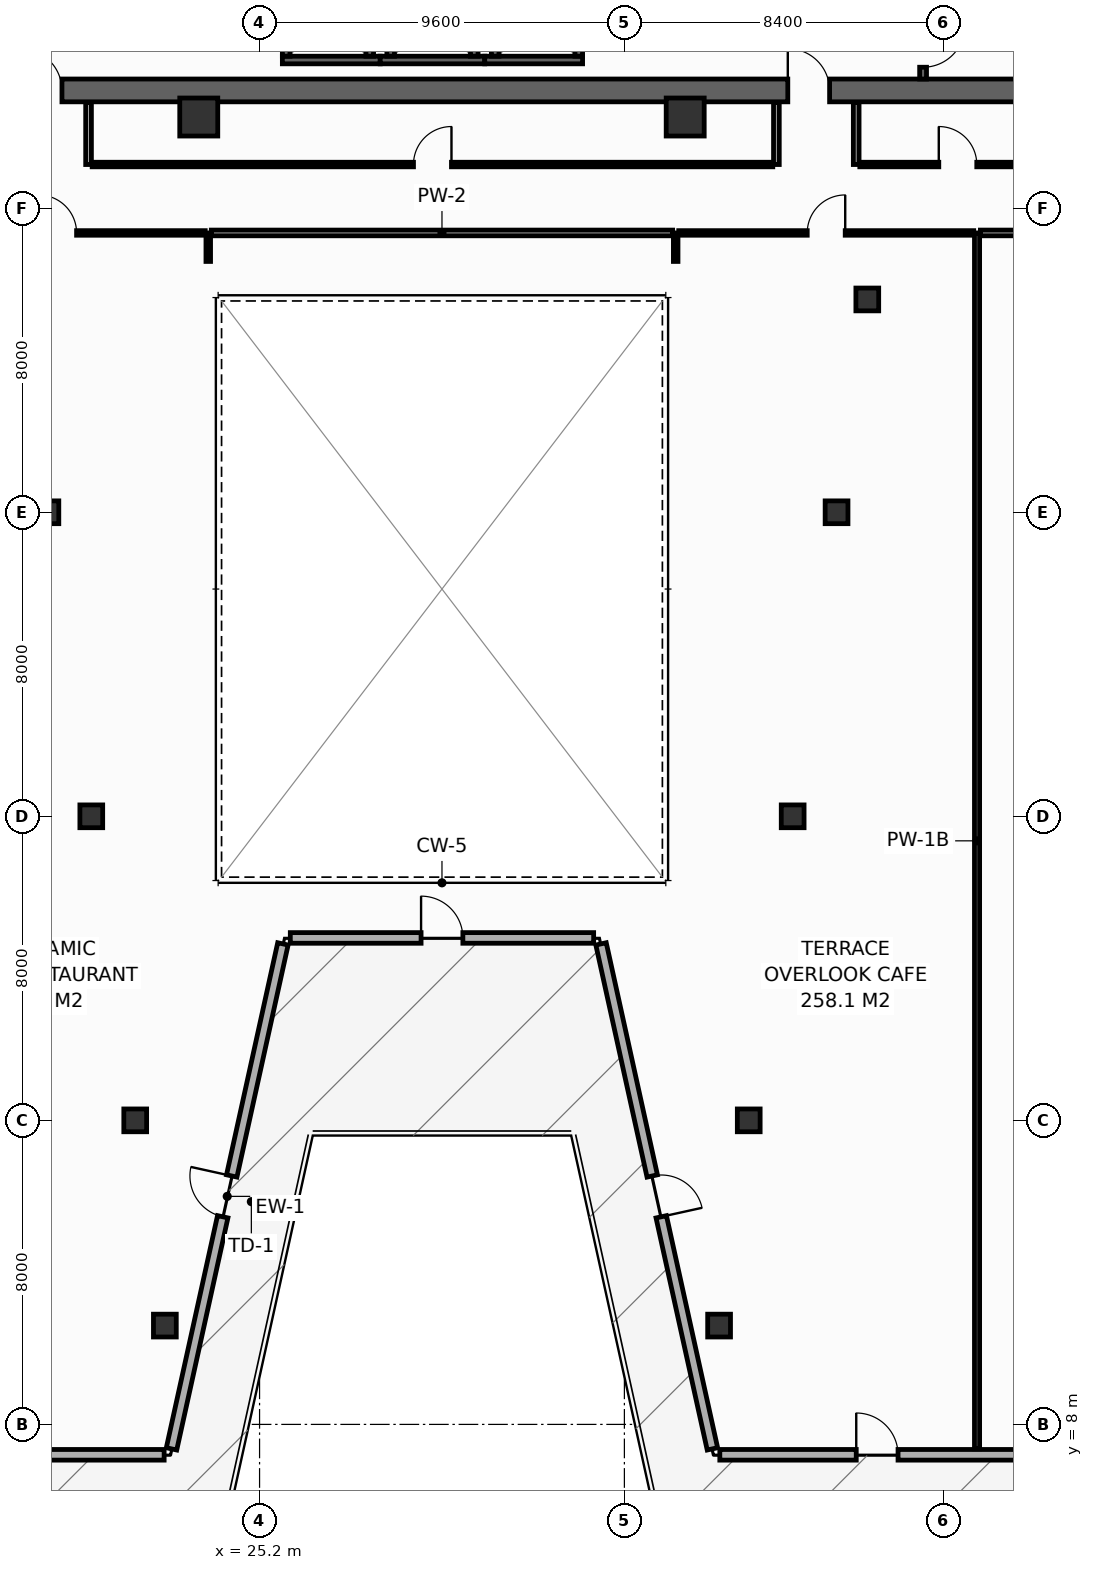
"""IFC4 building model, lengths in metres.
Left out: names, types, materials, properties, quantities, classifications, styles, units other than length and angle.
Written with IfcOpenShell. Run it as: python <this file> out.ifc"""

import sys

from ifc_helpers import new_model, si_unit, direction, frame, frame_2d, origin, origin_2d, place, context, subcontext, project, spatial, rectangle, hollow_rectangle, extrude, element, fill, save


model = new_model("IFC4")
c1 = context("Model", 3, precision=1e-05, world=origin(), true_north=direction((0.0, 1.0)))
c2 = subcontext(c1, "Body", "Model", "MODEL_VIEW")
j1 = project(units=[si_unit("LENGTHUNIT", "METRE"), si_unit("PLANEANGLEUNIT", "RADIAN")], contexts=[c1])
p1 = place(None, origin())
s1 = spatial("IfcSite", under=j1, at=p1, CompositionType="ELEMENT")
p2 = place(p1, origin())
s2 = spatial("IfcBuilding", under=s1, at=p2, CompositionType="ELEMENT")
p3 = place(p2, frame((0.0, 0.0, 101.6)))
s3 = spatial("IfcBuildingStorey", under=s2, at=p3, CompositionType="ELEMENT", Elevation=101.6)
p4 = place(p3, frame((13.5, 43.1, 0.0), z_axis=(0.0, 0.0, 1.0), x_axis=(1.0, 0.0, 0.0)))
e1 = element("IfcWall", 1, at=p4, inside=s3, PredefinedType="SHEAR", context=c2, shape_type="SweptSolid", body=[
    extrude(rectangle(XDim=32.9, YDim=0.6, at=frame_2d((16.45, 0.0))), origin(), (0.0, 0.0, 1.0), 4.15),
])
p5 = place(p4, frame((5.4, 0.0, 0.0)))
e2 = element("IfcOpeningElement", 2, at=p5, cuts=e1, PredefinedType="OPENING", context=c2, shape_type="SweptSolid", body=[
    extrude(rectangle(XDim=1.1, YDim=2.15, at=frame_2d((0.55, 1.075))), frame((0.0, 0.31, 0.0), z_axis=(0.0, -1.0, 0.0), x_axis=(1.0, 0.0, 0.0)), (0.0, 0.0, 1.0), 0.62),
])
p6 = place(p4, frame((25.6, 0.0, 0.0)))
e3 = element("IfcOpeningElement", 3, at=p6, cuts=e1, PredefinedType="OPENING", context=c2, shape_type="SweptSolid", body=[
    extrude(rectangle(XDim=1.1, YDim=2.15, at=frame_2d((0.55, 1.075))), frame((0.0, 0.31, 0.0), z_axis=(0.0, -1.0, 0.0), x_axis=(1.0, 0.0, 0.0)), (0.0, 0.0, 1.0), 0.62),
])
for number, where, z_axis, x_axis in (
    (4, (23.6, 42.4, 0.0), (0.0, 0.0, 1.0), (1.0, 0.0, 0.0)),
    (5, (36.4, 42.4, 0.0), (0.0, 0.0, 1.0), (1.0, 0.0, 0.0)),
):
    element("IfcColumn", number, at=place(p3, frame(where, z_axis=z_axis, x_axis=x_axis)), inside=s3, PredefinedType="COLUMN", context=c2, shape_type="SweptSolid", body=[
        extrude(hollow_rectangle(XDim=1.0, YDim=1.0, WallThickness=0.045, at=origin_2d()), origin(), (0.0, 0.0, 1.0), 4.4),
    ])
for number, where, z_axis, x_axis in (
    (6, (22.708, 10.6, 0.0), (0.0, 0.0, 1.0), (1.0, 0.0, 0.0)),
    (7, (37.292, 10.6, 0.0), (0.0, 0.0, 1.0), (1.0, 0.0, 0.0)),
    (8, (21.928, 16.0, 0.0), (0.0, 0.0, 1.0), (1.0, 0.0, 0.0)),
    (9, (38.072, 16.0, 0.0), (0.0, 0.0, 1.0), (1.0, 0.0, 0.0)),
    (10, (20.772, 24.0, 0.0), (0.0, 0.0, 1.0), (1.0, 0.0, 0.0)),
    (11, (39.228, 24.0, 0.0), (0.0, 0.0, 1.0), (1.0, 0.0, 0.0)),
    (12, (19.617, 32.0, 0.0), (0.0, 0.0, 1.0), (1.0, 0.0, 0.0)),
    (13, (40.383, 32.0, 0.0), (0.0, 0.0, 1.0), (1.0, 0.0, 0.0)),
    (14, (41.192, 37.6, 0.0), (0.0, 0.0, 1.0), (1.0, 0.0, 0.0)),
):
    element("IfcColumn", number, at=place(p3, frame(where, z_axis=z_axis, x_axis=x_axis)), inside=s3, PredefinedType="COLUMN", context=c2, shape_type="SweptSolid", body=[
        extrude(hollow_rectangle(XDim=0.6, YDim=0.6, WallThickness=0.028, at=origin_2d()), origin(), (0.0, 0.0, 1.0), 4.4),
    ])
p7 = place(p3, frame((25.8, 43.9, 0.0), z_axis=(0.0, 0.0, 1.0), x_axis=(1.0, 0.0, 0.0)))
e15 = element("IfcWall", 15, at=p7, inside=s3, PredefinedType="SHEAR", context=c2, shape_type="SweptSolid", body=[
    extrude(rectangle(XDim=2.575, YDim=0.2, at=frame_2d((1.288, 0.0))), origin(), (0.0, 0.0, 1.0), 4.15),
])
for number, where, z_axis, x_axis in (
    (16, (25.9, 44.0, 0.0), (0.0, 0.0, 1.0), (0.0, 1.0, 0.0)),
    (17, (28.1, 44.0, 0.0), (0.0, 0.0, 1.0), (0.0, 1.0, 0.0)),
):
    element("IfcWall", number, at=place(p3, frame(where, z_axis=z_axis, x_axis=x_axis)), inside=s3, PredefinedType="SHEAR", context=c2, shape_type="SweptSolid", body=[
        extrude(rectangle(XDim=2.3, YDim=0.2, at=frame_2d((1.15, 0.0))), origin(), (0.0, 0.0, 1.0), 4.15),
    ])
p8 = place(p3, frame((28.375, 43.9, 0.0), z_axis=(0.0, 0.0, 1.0), x_axis=(1.0, 0.0, 0.0)))
e18 = element("IfcWall", 18, at=p8, inside=s3, PredefinedType="SHEAR", context=c2, shape_type="SweptSolid", body=[
    extrude(rectangle(XDim=2.75, YDim=0.2, at=frame_2d((1.375, 0.0))), origin(), (0.0, 0.0, 1.0), 4.15),
])
for number, where, z_axis, x_axis in (
    (19, (28.65, 44.0, 0.0), (0.0, 0.0, 1.0), (0.0, 1.0, 0.0)),
    (20, (30.85, 44.0, 0.0), (0.0, 0.0, 1.0), (0.0, 1.0, 0.0)),
):
    element("IfcWall", number, at=place(p3, frame(where, z_axis=z_axis, x_axis=x_axis)), inside=s3, PredefinedType="SHEAR", context=c2, shape_type="SweptSolid", body=[
        extrude(rectangle(XDim=2.3, YDim=0.2, at=frame_2d((1.15, 0.0))), origin(), (0.0, 0.0, 1.0), 4.15),
    ])
p9 = place(p3, frame((31.125, 43.9, 0.0), z_axis=(0.0, 0.0, 1.0), x_axis=(1.0, 0.0, 0.0)))
e21 = element("IfcWall", 21, at=p9, inside=s3, PredefinedType="SHEAR", context=c2, shape_type="SweptSolid", body=[
    extrude(rectangle(XDim=2.575, YDim=0.2, at=frame_2d((1.288, 0.0))), origin(), (0.0, 0.0, 1.0), 4.15),
])
for number, where, z_axis, x_axis in (
    (22, (31.4, 44.0, 0.0), (0.0, 0.0, 1.0), (0.0, 1.0, 0.0)),
    (23, (33.6, 44.0, 0.0), (0.0, 0.0, 1.0), (0.0, 1.0, 0.0)),
):
    element("IfcWall", number, at=place(p3, frame(where, z_axis=z_axis, x_axis=x_axis)), inside=s3, PredefinedType="SHEAR", context=c2, shape_type="SweptSolid", body=[
        extrude(rectangle(XDim=2.3, YDim=0.2, at=frame_2d((1.15, 0.0))), origin(), (0.0, 0.0, 1.0), 4.15),
    ])
p10 = place(p3, frame((42.66, 53.8, 0.0), z_axis=(0.0, 0.0, 1.0), x_axis=(0.0, -1.0, 0.0)))
e24 = element("IfcWall", 24, at=p10, inside=s3, PredefinedType="SHEAR", context=c2, shape_type="SweptSolid", body=[
    extrude(rectangle(XDim=10.4, YDim=0.18, at=frame_2d((5.2, 0.0))), origin(), (0.0, 0.0, 1.0), 4.15),
])
p11 = place(p10, frame((8.99, 0.0, 0.0)))
e25 = element("IfcOpeningElement", 25, at=p11, cuts=e24, PredefinedType="OPENING", context=c2, shape_type="SweptSolid", body=[
    extrude(rectangle(XDim=1.1, YDim=2.15, at=frame_2d((0.55, 1.075))), frame((0.0, 0.1, 0.0), z_axis=(0.0, -1.0, 0.0), x_axis=(1.0, 0.0, 0.0)), (0.0, 0.0, 1.0), 0.2),
])
p12 = place(p3, frame((14.409, 7.2, 0.0), z_axis=(0.0, 0.0, 1.0), x_axis=(1.0, 0.0, 0.0)))
e26 = element("IfcWall", 26, at=p12, inside=s3, PredefinedType="STANDARD", context=c2, shape_type="SweptSolid", body=[
    extrude(rectangle(XDim=8.28, YDim=0.28, at=frame_2d((4.14, 0.0))), origin(), (0.0, 0.0, 1.0), 4.15),
])
p13 = place(p12, frame((3.59, 0.0, 0.0)))
e27 = element("IfcOpeningElement", 27, at=p13, cuts=e26, PredefinedType="OPENING", context=c2, shape_type="SweptSolid", body=[
    extrude(rectangle(XDim=1.1, YDim=2.2, at=frame_2d((0.55, 1.1))), frame((0.0, 0.15, 0.0), z_axis=(0.0, -1.0, 0.0), x_axis=(1.0, 0.0, 0.0)), (0.0, 0.0, 1.0), 0.3),
])
p14 = place(p3, frame((22.883, 7.356, 0.0), z_axis=(0.0, 0.0, 1.0), x_axis=(0.215414184939, 0.976522774403, 0.0)))
e28 = element("IfcWall", 28, at=p14, inside=s3, PredefinedType="STANDARD", context=c2, shape_type="SweptSolid", body=[
    extrude(rectangle(XDim=13.607, YDim=0.28, at=frame_2d((6.803, 0.0))), origin(), (0.0, 0.0, 1.0), 4.15),
])
p15 = place(p14, frame((6.254, 0.0, 0.0)))
e29 = element("IfcOpeningElement", 29, at=p15, cuts=e28, PredefinedType="OPENING", context=c2, shape_type="SweptSolid", body=[
    extrude(rectangle(XDim=1.1, YDim=2.2, at=frame_2d((0.55, 1.1))), frame((0.0, 0.15, 0.0), z_axis=(0.0, -1.0, 0.0), x_axis=(1.0, 0.0, 0.0)), (0.0, 0.0, 1.0), 0.3),
])
p16 = place(p3, frame((26.009, 20.8, 0.0), z_axis=(0.0, 0.0, 1.0), x_axis=(1.0, 0.0, 0.0)))
e30 = element("IfcWall", 30, at=p16, inside=s3, PredefinedType="STANDARD", context=c2, shape_type="SweptSolid", body=[
    extrude(rectangle(XDim=7.982, YDim=0.28, at=frame_2d((3.991, 0.0))), origin(), (0.0, 0.0, 1.0), 4.15),
])
p17 = place(p16, frame((3.441, 0.0, 0.0)))
e31 = element("IfcOpeningElement", 31, at=p17, cuts=e30, PredefinedType="OPENING", context=c2, shape_type="SweptSolid", body=[
    extrude(rectangle(XDim=1.1, YDim=2.2, at=frame_2d((0.55, 1.1))), frame((0.0, 0.15, 0.0), z_axis=(0.0, -1.0, 0.0), x_axis=(1.0, 0.0, 0.0)), (0.0, 0.0, 1.0), 0.3),
])
p18 = place(p3, frame((34.186, 20.644, 0.0), z_axis=(0.0, 0.0, 1.0), x_axis=(0.215414184939, -0.976522774403, 0.0)))
e32 = element("IfcWall", 32, at=p18, inside=s3, PredefinedType="STANDARD", context=c2, shape_type="SweptSolid", body=[
    extrude(rectangle(XDim=13.607, YDim=0.28, at=frame_2d((6.803, 0.0))), origin(), (0.0, 0.0, 1.0), 4.15),
])
p19 = place(p18, frame((6.254, 0.0, 0.0)))
e33 = element("IfcOpeningElement", 33, at=p19, cuts=e32, PredefinedType="OPENING", context=c2, shape_type="SweptSolid", body=[
    extrude(rectangle(XDim=1.1, YDim=2.2, at=frame_2d((0.55, 1.1))), frame((0.0, 0.15, 0.0), z_axis=(0.0, -1.0, 0.0), x_axis=(1.0, 0.0, 0.0)), (0.0, 0.0, 1.0), 0.3),
])
p20 = place(p3, frame((37.311, 7.2, 0.0), z_axis=(0.0, 0.0, 1.0), x_axis=(1.0, 0.0, 0.0)))
e34 = element("IfcWall", 34, at=p20, inside=s3, PredefinedType="STANDARD", context=c2, shape_type="SweptSolid", body=[
    extrude(rectangle(XDim=8.28, YDim=0.28, at=frame_2d((4.14, 0.0))), origin(), (0.0, 0.0, 1.0), 4.15),
])
p21 = place(p20, frame((3.59, 0.0, 0.0)))
e35 = element("IfcOpeningElement", 35, at=p21, cuts=e34, PredefinedType="OPENING", context=c2, shape_type="SweptSolid", body=[
    extrude(rectangle(XDim=1.1, YDim=2.2, at=frame_2d((0.55, 1.1))), frame((0.0, 0.15, 0.0), z_axis=(0.0, -1.0, 0.0), x_axis=(1.0, 0.0, 0.0)), (0.0, 0.0, 1.0), 0.3),
])
for number, where, z_axis, x_axis in (
    (36, (20.7, 41.15, 0.0), (0.0, 0.0, 1.0), (0.0, 1.0, 0.0)),
    (37, (38.8, 41.15, 0.0), (0.0, 0.0, 1.0), (0.0, 1.0, 0.0)),
    (38, (40.9, 41.15, 0.0), (0.0, 0.0, 1.0), (0.0, 1.0, 0.0)),
):
    element("IfcWall", number, at=place(p3, frame(where, z_axis=z_axis, x_axis=x_axis)), inside=s3, PredefinedType="PARTITIONING", context=c2, shape_type="SweptSolid", body=[
        extrude(rectangle(XDim=1.63, YDim=0.15, at=frame_2d((0.815, 0.0))), origin(), (0.0, 0.0, 1.0), 4.15),
    ])
p22 = place(p3, frame((20.795, 41.15, 0.0), z_axis=(0.0, 0.0, 1.0), x_axis=(1.0, 0.0, 0.0)))
e39 = element("IfcWall", 39, at=p22, inside=s3, PredefinedType="PARTITIONING", context=c2, shape_type="SweptSolid", body=[
    extrude(rectangle(XDim=17.91, YDim=0.12, at=frame_2d((8.955, 0.0))), origin(), (0.0, 0.0, 1.0), 3.335),
])
p23 = place(p22, frame((8.455, 0.0, 0.0)))
e40 = element("IfcOpeningElement", 40, at=p23, cuts=e39, PredefinedType="OPENING", context=c2, shape_type="SweptSolid", body=[
    extrude(rectangle(XDim=1.0, YDim=2.15, at=frame_2d((0.5, 1.075))), frame((0.0, 0.07, 0.0), z_axis=(0.0, -1.0, 0.0), x_axis=(1.0, 0.0, 0.0)), (0.0, 0.0, 1.0), 0.14),
])
p24 = place(p3, frame((40.995, 41.15, 0.0), z_axis=(0.0, 0.0, 1.0), x_axis=(1.0, 0.0, 0.0)))
e41 = element("IfcWall", 41, at=p24, inside=s3, PredefinedType="PARTITIONING", context=c2, shape_type="SweptSolid", body=[
    extrude(rectangle(XDim=5.155, YDim=0.12, at=frame_2d((2.577, 0.0))), origin(), (0.0, 0.0, 1.0), 4.15),
])
p25 = place(p24, frame((2.078, 0.0, 0.0)))
e42 = element("IfcOpeningElement", 42, at=p25, cuts=e41, PredefinedType="OPENING", context=c2, shape_type="SweptSolid", body=[
    extrude(rectangle(XDim=1.0, YDim=2.15, at=frame_2d((0.5, 1.075))), frame((0.0, 0.07, 0.0), z_axis=(0.0, -1.0, 0.0), x_axis=(1.0, 0.0, 0.0)), (0.0, 0.0, 1.0), 0.14),
])
p26 = place(p3, frame((44.08, 7.36, 0.0), z_axis=(0.0, 0.0, 1.0), x_axis=(0.0, 1.0, 0.0)))
e43 = element("IfcWall", 43, at=p26, inside=s3, PredefinedType="PARTITIONING", context=c2, shape_type="SweptSolid", body=[
    extrude(rectangle(XDim=31.99, YDim=0.135, at=frame_2d((15.995, 0.0))), origin(), (0.0, 0.0, 1.0), 3.335),
])
for number, where, z_axis, x_axis in (
    (44, (23.85, 38.6, 0.0), (0.0, 0.0, 1.0), (0.0, 1.0, 0.0)),
    (45, (36.15, 38.6, 0.0), (0.0, 0.0, 1.0), (0.0, 1.0, 0.0)),
):
    element("IfcWall", number, at=place(p3, frame(where, z_axis=z_axis, x_axis=x_axis)), inside=s3, PredefinedType="PARTITIONING", context=c2, shape_type="SweptSolid", body=[
        extrude(rectangle(XDim=0.75, YDim=0.12, at=frame_2d((0.375, 0.0))), origin(), (0.0, 0.0, 1.0), 4.15),
    ])
p27 = place(p3, frame((16.0, 39.35, 0.0), z_axis=(0.0, 0.0, 1.0), x_axis=(1.0, 0.0, 0.0)))
e46 = element("IfcWall", 46, at=p27, inside=s3, PredefinedType="PARTITIONING", context=c2, shape_type="SweptSolid", body=[
    extrude(rectangle(XDim=7.77, YDim=0.12, at=frame_2d((3.885, 0.0))), origin(), (0.0, 0.0, 1.0), 3.335),
])
p28 = place(p27, frame((3.385, 0.0, 0.0)))
e47 = element("IfcOpeningElement", 47, at=p28, cuts=e46, PredefinedType="OPENING", context=c2, shape_type="SweptSolid", body=[
    extrude(rectangle(XDim=1.0, YDim=2.15, at=frame_2d((0.5, 1.075))), frame((0.0, 0.07, 0.0), z_axis=(0.0, -1.0, 0.0), x_axis=(1.0, 0.0, 0.0)), (0.0, 0.0, 1.0), 0.14),
])
p29 = place(p3, frame((23.93, 39.35, 0.0), z_axis=(0.0, 0.0, 1.0), x_axis=(1.0, 0.0, 0.0)))
e48 = element("IfcWall", 48, at=p29, inside=s3, PredefinedType="PARTITIONING", context=c2, shape_type="SweptSolid", body=[
    extrude(rectangle(XDim=12.14, YDim=0.15, at=frame_2d((6.07, 0.0))), origin(), (0.0, 0.0, 1.0), 4.15),
])
p30 = place(p3, frame((36.23, 39.35, 0.0), z_axis=(0.0, 0.0, 1.0), x_axis=(1.0, 0.0, 0.0)))
e49 = element("IfcWall", 49, at=p30, inside=s3, PredefinedType="PARTITIONING", context=c2, shape_type="SweptSolid", body=[
    extrude(rectangle(XDim=7.762, YDim=0.12, at=frame_2d((3.881, 0.0))), origin(), (0.0, 0.0, 1.0), 3.335),
])
p31 = place(p30, frame((3.381, 0.0, 0.0)))
e50 = element("IfcOpeningElement", 50, at=p31, cuts=e49, PredefinedType="OPENING", context=c2, shape_type="SweptSolid", body=[
    extrude(rectangle(XDim=1.0, YDim=2.15, at=frame_2d((0.5, 1.075))), frame((0.0, 0.07, 0.0), z_axis=(0.0, -1.0, 0.0), x_axis=(1.0, 0.0, 0.0)), (0.0, 0.0, 1.0), 0.14),
])
p32 = place(p3, frame((44.167, 39.35, 0.0), z_axis=(0.0, 0.0, 1.0), x_axis=(1.0, 0.0, 0.0)))
e51 = element("IfcWall", 51, at=p32, inside=s3, PredefinedType="PARTITIONING", context=c2, shape_type="SweptSolid", body=[
    extrude(rectangle(XDim=9.528, YDim=0.15, at=frame_2d((4.764, 0.0))), origin(), (0.0, 0.0, 1.0), 3.635),
])
p33 = place(p32, frame((4.239, 0.0, 0.0)))
e52 = element("IfcOpeningElement", 52, at=p33, cuts=e51, PredefinedType="OPENING", context=c2, shape_type="SweptSolid", body=[
    extrude(rectangle(XDim=1.05, YDim=2.15, at=frame_2d((0.525, 1.075))), frame((0.0, 0.085, 0.0), z_axis=(0.0, -1.0, 0.0), x_axis=(1.0, 0.0, 0.0)), (0.0, 0.0, 1.0), 0.17),
])
p34 = place(p11, origin())
e53 = element("IfcDoor", 53, at=p34, inside=s3, OperationType="SINGLE_SWING_LEFT", PredefinedType="DOOR", context=c2, shape_type="SweptSolid", body=[
    extrude(rectangle(XDim=1.1, YDim=2.15, at=frame_2d((0.55, 1.075))), frame((0.0, 0.025, 0.0), z_axis=(0.0, -1.0, 0.0), x_axis=(1.0, 0.0, 0.0)), (0.0, 0.0, 1.0), 0.05),
])
fill(e25, e53)
p35 = place(p5, origin())
e54 = element("IfcDoor", 54, at=p35, inside=s3, OperationType="SINGLE_SWING_LEFT", PredefinedType="DOOR", context=c2, shape_type="SweptSolid", body=[
    extrude(rectangle(XDim=1.1, YDim=2.15, at=frame_2d((0.55, 1.075))), frame((0.0, 0.025, 0.0), z_axis=(0.0, -1.0, 0.0), x_axis=(1.0, 0.0, 0.0)), (0.0, 0.0, 1.0), 0.05),
])
fill(e2, e54)
p36 = place(p6, origin())
e55 = element("IfcDoor", 55, at=p36, inside=s3, OperationType="SINGLE_SWING_LEFT", PredefinedType="DOOR", context=c2, shape_type="SweptSolid", body=[
    extrude(rectangle(XDim=1.1, YDim=2.15, at=frame_2d((0.55, 1.075))), frame((0.0, 0.025, 0.0), z_axis=(0.0, -1.0, 0.0), x_axis=(1.0, 0.0, 0.0)), (0.0, 0.0, 1.0), 0.05),
])
fill(e3, e55)
p37 = place(p15, origin())
e56 = element("IfcDoor", 56, at=p37, inside=s3, OperationType="SINGLE_SWING_RIGHT", PredefinedType="DOOR", context=c2, shape_type="SweptSolid", body=[
    extrude(rectangle(XDim=1.1, YDim=2.2, at=frame_2d((0.55, 1.1))), frame((0.0, 0.025, 0.0), z_axis=(0.0, -1.0, 0.0), x_axis=(1.0, 0.0, 0.0)), (0.0, 0.0, 1.0), 0.05),
])
fill(e29, e56)
p38 = place(p17, origin())
e57 = element("IfcDoor", 57, at=p38, inside=s3, OperationType="SINGLE_SWING_LEFT", PredefinedType="DOOR", context=c2, shape_type="SweptSolid", body=[
    extrude(rectangle(XDim=1.1, YDim=2.2, at=frame_2d((0.55, 1.1))), frame((0.0, 0.025, 0.0), z_axis=(0.0, -1.0, 0.0), x_axis=(1.0, 0.0, 0.0)), (0.0, 0.0, 1.0), 0.05),
])
fill(e31, e57)
p39 = place(p19, origin())
e58 = element("IfcDoor", 58, at=p39, inside=s3, OperationType="SINGLE_SWING_RIGHT", PredefinedType="DOOR", context=c2, shape_type="SweptSolid", body=[
    extrude(rectangle(XDim=1.1, YDim=2.2, at=frame_2d((0.55, 1.1))), frame((0.0, 0.025, 0.0), z_axis=(0.0, -1.0, 0.0), x_axis=(1.0, 0.0, 0.0)), (0.0, 0.0, 1.0), 0.05),
])
fill(e33, e58)
p40 = place(p21, origin())
e59 = element("IfcDoor", 59, at=p40, inside=s3, OperationType="SINGLE_SWING_LEFT", PredefinedType="DOOR", context=c2, shape_type="SweptSolid", body=[
    extrude(rectangle(XDim=1.1, YDim=2.2, at=frame_2d((0.55, 1.1))), frame((0.0, 0.025, 0.0), z_axis=(0.0, -1.0, 0.0), x_axis=(1.0, 0.0, 0.0)), (0.0, 0.0, 1.0), 0.05),
])
fill(e35, e59)
p41 = place(p23, origin())
e60 = element("IfcDoor", 60, at=p41, inside=s3, OperationType="SINGLE_SWING_RIGHT", PredefinedType="DOOR", context=c2, shape_type="SweptSolid", body=[
    extrude(rectangle(XDim=1.0, YDim=2.15, at=frame_2d((0.5, 1.075))), frame((0.0, 0.025, 0.0), z_axis=(0.0, -1.0, 0.0), x_axis=(1.0, 0.0, 0.0)), (0.0, 0.0, 1.0), 0.05),
])
fill(e40, e60)
p42 = place(p25, origin())
e61 = element("IfcDoor", 61, at=p42, inside=s3, OperationType="SINGLE_SWING_LEFT", PredefinedType="DOOR", context=c2, shape_type="SweptSolid", body=[
    extrude(rectangle(XDim=1.0, YDim=2.15, at=frame_2d((0.5, 1.075))), frame((0.0, 0.025, 0.0), z_axis=(0.0, -1.0, 0.0), x_axis=(1.0, 0.0, 0.0)), (0.0, 0.0, 1.0), 0.05),
])
fill(e42, e61)
p43 = place(p28, origin())
e62 = element("IfcDoor", 62, at=p43, inside=s3, OperationType="SINGLE_SWING_LEFT", PredefinedType="DOOR", context=c2, shape_type="SweptSolid", body=[
    extrude(rectangle(XDim=1.0, YDim=2.15, at=frame_2d((0.5, 1.075))), frame((0.0, 0.025, 0.0), z_axis=(0.0, -1.0, 0.0), x_axis=(1.0, 0.0, 0.0)), (0.0, 0.0, 1.0), 0.05),
])
fill(e47, e62)
p44 = place(p31, origin())
e63 = element("IfcDoor", 63, at=p44, inside=s3, OperationType="SINGLE_SWING_RIGHT", PredefinedType="DOOR", context=c2, shape_type="SweptSolid", body=[
    extrude(rectangle(XDim=1.0, YDim=2.15, at=frame_2d((0.5, 1.075))), frame((0.0, 0.025, 0.0), z_axis=(0.0, -1.0, 0.0), x_axis=(1.0, 0.0, 0.0)), (0.0, 0.0, 1.0), 0.05),
])
fill(e50, e63)
save(model, sys.argv[1])
